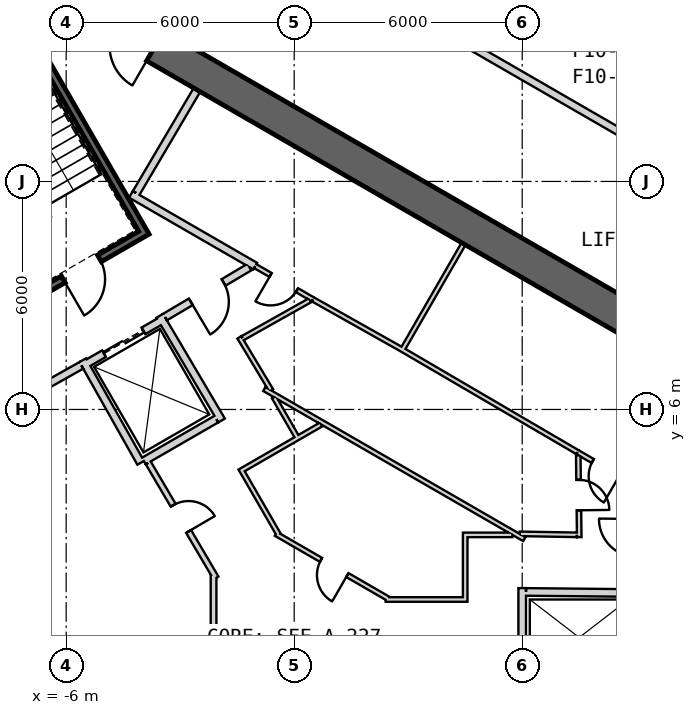
"""IFC4 building model, lengths in metres.
Left out: names, types, materials, properties, quantities, classifications, styles, units other than length and angle.
Written with IfcOpenShell. Run it as: python <this file> out.ifc"""

import sys

from ifc_helpers import new_model, si_unit, direction, frame, frame_2d, origin, place, context, subcontext, project, spatial, rectangle, extrude, element, fill, save


model = new_model("IFC4")
c1 = context("Model", 3, precision=1e-05, world=origin(), true_north=direction((0.0, 1.0)))
c2 = subcontext(c1, "Body", "Model", "MODEL_VIEW")
j1 = project(units=[si_unit("LENGTHUNIT", "METRE"), si_unit("PLANEANGLEUNIT", "RADIAN")], contexts=[c1])
p1 = place(None, origin())
s1 = spatial("IfcSite", under=j1, at=p1, CompositionType="ELEMENT")
p2 = place(p1, origin())
s2 = spatial("IfcBuilding", under=s1, at=p2, CompositionType="ELEMENT")
p3 = place(p2, frame((0.0, 0.0, 241.2)))
s3 = spatial("IfcBuildingStorey", under=s2, at=p3, CompositionType="ELEMENT", Elevation=241.2)
p4 = place(p3, frame((19.475, 2.208, 0.0), z_axis=(0.0, 0.0, 1.0), x_axis=(-0.866028369851, 0.499994862586, 0.0)))
e1 = element("IfcWall", 1, at=p4, inside=s3, PredefinedType="SHEAR", context=c2, shape_type="SweptSolid", body=[
    extrude(rectangle(XDim=31.523, YDim=0.9, at=frame_2d((15.762, 0.0))), origin(), (0.0, 0.0, 1.0), 4.0),
])
p5 = place(p4, frame((7.062, 0.0, 0.0)))
e2 = element("IfcOpeningElement", 2, at=p5, cuts=e1, PredefinedType="OPENING", context=c2, shape_type="SweptSolid", body=[
    extrude(rectangle(XDim=1.2, YDim=2.4, at=frame_2d((0.6, 1.2))), frame((0.0, 0.46, 0.0), z_axis=(0.0, -1.0, 0.0), x_axis=(1.0, 0.0, 0.0)), (0.0, 0.0, 1.0), 0.92),
])
p6 = place(p4, frame((3.612, 0.0, 0.0)))
e3 = element("IfcOpeningElement", 3, at=p6, cuts=e1, PredefinedType="OPENING", context=c2, shape_type="SweptSolid", body=[
    extrude(rectangle(XDim=1.2, YDim=2.4, at=frame_2d((0.6, 1.2))), frame((0.0, 0.46, 0.0), z_axis=(0.0, -1.0, 0.0), x_axis=(1.0, 0.0, 0.0)), (0.0, 0.0, 1.0), 0.92),
])
p7 = place(p4, frame((26.712, 0.0, 0.0)))
e4 = element("IfcOpeningElement", 4, at=p7, cuts=e1, PredefinedType="OPENING", context=c2, shape_type="SweptSolid", body=[
    extrude(rectangle(XDim=1.2, YDim=2.4, at=frame_2d((0.6, 1.2))), frame((0.0, 0.46, 0.0), z_axis=(0.0, -1.0, 0.0), x_axis=(1.0, 0.0, 0.0)), (0.0, 0.0, 1.0), 0.92),
])
p8 = place(p3, frame((6.0, -1.03, 0.0), z_axis=(0.0, 0.0, 1.0), x_axis=(0.0, 1.0, 0.0)))
e5 = element("IfcWall", 5, at=p8, inside=s3, PredefinedType="PLUMBINGWALL", context=c2, shape_type="SweptSolid", body=[
    extrude(rectangle(XDim=2.33, YDim=0.2, at=frame_2d((1.165, 0.0))), origin(), (0.0, 0.0, 1.0), 3.7),
])
p9 = place(p3, frame((9.1, 1.169, 0.0), z_axis=(0.0, 0.0, 1.0), x_axis=(-0.99994990606, 0.010009264196, 0.0)))
e6 = element("IfcWall", 6, at=p9, inside=s3, PredefinedType="PLUMBINGWALL", context=c2, shape_type="SweptSolid", body=[
    extrude(rectangle(XDim=3.0, YDim=0.2, at=frame_2d((1.5, 0.0))), origin(), (0.0, 0.0, 1.0), 3.7),
])
p10 = place(p3, frame((-7.854, 17.405, -0.3), z_axis=(0.0, 0.0, 1.0), x_axis=(0.499997992926, -0.866026562566, 0.0)))
e7 = element("IfcWall", 7, at=p10, inside=s3, PredefinedType="SHEAR", context=c2, shape_type="SweptSolid", body=[
    extrude(rectangle(XDim=7.9, YDim=0.2, at=frame_2d((3.95, 0.0))), origin(), (0.0, 0.0, 1.0), 4.0),
])
p11 = place(p3, frame((-7.159, 8.8, -0.3), z_axis=(0.0, 0.0, 1.0), x_axis=(0.866047807691, 0.499961193289, 0.0)))
e8 = element("IfcWall", 8, at=p11, inside=s3, PredefinedType="SHEAR", context=c2, shape_type="SweptSolid", body=[
    extrude(rectangle(XDim=3.6, YDim=0.2, at=frame_2d((1.8, 0.0))), origin(), (0.0, 0.0, 1.0), 4.0),
])
p12 = place(p11, frame((1.25, 0.0, 0.3)))
e9 = element("IfcOpeningElement", 9, at=p12, cuts=e8, PredefinedType="OPENING", context=c2, shape_type="SweptSolid", body=[
    extrude(rectangle(XDim=1.1, YDim=2.1, at=frame_2d((0.55, 1.05))), frame((0.0, 0.11, 0.0), z_axis=(0.0, -1.0, 0.0), x_axis=(1.0, 0.0, 0.0)), (0.0, 0.0, 1.0), 0.22),
])
p13 = place(p3, frame((-5.524, 7.168, 0.0), z_axis=(0.0, 0.0, 1.0), x_axis=(0.866024647952, 0.500001309137, 0.0)))
e10 = element("IfcWall", 10, at=p13, inside=s3, PredefinedType="PLUMBINGWALL", context=c2, shape_type="SweptSolid", body=[
    extrude(rectangle(XDim=2.4, YDim=0.2, at=frame_2d((1.2, 0.0))), origin(), (0.0, 0.0, 1.0), 3.7),
])
p14 = place(p13, frame((0.6, 0.0, 0.0)))
e11 = element("IfcOpeningElement", 11, at=p14, cuts=e10, PredefinedType="OPENING", context=c2, shape_type="SweptSolid", body=[
    extrude(rectangle(XDim=1.2, YDim=2.4, at=frame_2d((0.6, 1.2))), frame((0.0, 0.11, 0.0), z_axis=(0.0, -1.0, 0.0), x_axis=(1.0, 0.0, 0.0)), (0.0, 0.0, 1.0), 0.22),
])
p15 = place(p3, frame((-4.039, 4.596, 0.0), z_axis=(0.0, 0.0, 1.0), x_axis=(-0.491322718731, 0.870977603649, 0.0)))
e12 = element("IfcWall", 12, at=p15, inside=s3, PredefinedType="PLUMBINGWALL", context=c2, shape_type="SweptSolid", body=[
    extrude(rectangle(XDim=3.1, YDim=0.2, at=frame_2d((1.55, 0.0))), origin(), (0.0, 0.0, 1.0), 3.7),
])
p16 = place(p3, frame((-3.538, 8.465, 0.0), z_axis=(0.0, 0.0, 1.0), x_axis=(0.508616218331, -0.860993346345, 0.0)))
e13 = element("IfcWall", 13, at=p16, inside=s3, PredefinedType="PLUMBINGWALL", context=c2, shape_type="SweptSolid", body=[
    extrude(rectangle(XDim=3.2, YDim=0.2, at=frame_2d((1.6, 0.0))), origin(), (0.0, 0.0, 1.0), 3.7),
])
p17 = place(p3, frame((-2.047, 5.746, 0.0), z_axis=(0.0, 0.0, 1.0), x_axis=(-0.866019606374, -0.500010041276, 0.0)))
e14 = element("IfcWall", 14, at=p17, inside=s3, PredefinedType="PLUMBINGWALL", context=c2, shape_type="SweptSolid", body=[
    extrude(rectangle(XDim=2.205, YDim=0.2, at=frame_2d((1.102, 0.0))), origin(), (0.0, 0.0, 1.0), 3.7),
])
p18 = place(p3, frame((4.457, 10.359, 0.0), z_axis=(0.0, 0.0, 1.0), x_axis=(-0.500017246033, -0.866015446554, 0.0)))
e15 = element("IfcWall", 15, at=p18, inside=s3, PredefinedType="PARTITIONING", context=c2, shape_type="SweptSolid", body=[
    extrude(rectangle(XDim=3.25, YDim=0.12, at=frame_2d((1.625, 0.0))), origin(), (0.0, 0.0, 1.0), 3.7),
])
p19 = place(p3, frame((2.821, 7.586, 0.0), z_axis=(0.0, 0.0, 1.0), x_axis=(0.863262357411, -0.504755487615, 0.0)))
e16 = element("IfcWall", 16, at=p19, inside=s3, PredefinedType="PARTITIONING", context=c2, shape_type="SweptSolid", body=[
    extrude(rectangle(XDim=5.37, YDim=0.12, at=frame_2d((2.685, 0.0))), origin(), (0.0, 0.0, 1.0), 3.7),
])
p20 = place(p3, frame((-1.024, 9.771, 0.0), z_axis=(0.0, 0.0, 1.0), x_axis=(0.866039397417, -0.499975761534, 0.0)))
e17 = element("IfcWall", 17, at=p20, inside=s3, PredefinedType="PARTITIONING", context=c2, shape_type="SweptSolid", body=[
    extrude(rectangle(XDim=1.752, YDim=0.12, at=frame_2d((0.876, 0.0))), origin(), (0.0, 0.0, 1.0), 3.7),
])
p21 = place(p20, frame((0.466, 0.0, 0.0)))
e18 = element("IfcOpeningElement", 18, at=p21, cuts=e17, PredefinedType="OPENING", context=c2, shape_type="SweptSolid", body=[
    extrude(rectangle(XDim=0.8, YDim=2.1, at=frame_2d((0.4, 1.05))), frame((0.0, 0.07, 0.0), z_axis=(0.0, -1.0, 0.0), x_axis=(1.0, 0.0, 0.0)), (0.0, 0.0, 1.0), 0.14),
])
p22 = place(p3, frame((7.457, 4.875, 0.0), z_axis=(0.0, 0.0, 1.0), x_axis=(0.866027945518, -0.499995597562, 0.0)))
e19 = element("IfcWall", 19, at=p22, inside=s3, PredefinedType="PARTITIONING", context=c2, shape_type="SweptSolid", body=[
    extrude(rectangle(XDim=1.702, YDim=0.12, at=frame_2d((0.851, 0.0))), origin(), (0.0, 0.0, 1.0), 3.7),
])
p23 = place(p22, frame((0.461, 0.0, 0.0)))
e20 = element("IfcOpeningElement", 20, at=p23, cuts=e19, PredefinedType="OPENING", context=c2, shape_type="SweptSolid", body=[
    extrude(rectangle(XDim=0.8, YDim=2.1, at=frame_2d((0.4, 1.05))), frame((0.0, 0.07, 0.0), z_axis=(0.0, -1.0, 0.0), x_axis=(1.0, 0.0, 0.0)), (0.0, 0.0, 1.0), 0.14),
])
p24 = place(p3, frame((-4.296, 11.66, 0.0), z_axis=(0.0, 0.0, 1.0), x_axis=(0.866027389382, -0.499996560828, 0.0)))
e21 = element("IfcWall", 21, at=p24, inside=s3, PredefinedType="PARTITIONING", context=c2, shape_type="SweptSolid", body=[
    extrude(rectangle(XDim=3.778, YDim=0.2, at=frame_2d((1.889, 0.0))), origin(), (0.0, 0.0, 1.0), 3.7),
])
p25 = place(p3, frame((-2.558, 14.409, 0.0), z_axis=(0.0, 0.0, 1.0), x_axis=(-0.508018930956, -0.861345903683, 0.0)))
e22 = element("IfcWall", 22, at=p25, inside=s3, PredefinedType="PARTITIONING", context=c2, shape_type="SweptSolid", body=[
    extrude(rectangle(XDim=3.15, YDim=0.2, at=frame_2d((1.575, 0.0))), origin(), (0.0, 0.0, 1.0), 3.7),
])
p26 = place(p3, frame((0.494, 8.896, 0.0), z_axis=(0.0, 0.0, 1.0), x_axis=(0.871426548871, -0.490526013503, 0.0)))
e23 = element("IfcWall", 23, at=p26, inside=s3, PredefinedType="PARTITIONING", context=c2, shape_type="SweptSolid", body=[
    extrude(rectangle(XDim=2.67, YDim=0.12, at=frame_2d((1.335, 0.0))), origin(), (0.0, 0.0, 1.0), 3.7),
])
p27 = place(p3, frame((-5.6, 7.16, 0.0), z_axis=(0.0, 0.0, 1.0), x_axis=(-0.871340486379, -0.490678873396, 0.0)))
e24 = element("IfcWall", 24, at=p27, inside=s3, PredefinedType="PARTITIONING", context=c2, shape_type="SweptSolid", body=[
    extrude(rectangle(XDim=2.581, YDim=0.2, at=frame_2d((1.291, 0.0))), origin(), (0.0, 0.0, 1.0), 3.7),
])
p28 = place(p3, frame((-1.179, 9.745, 0.0), z_axis=(0.0, 0.0, 1.0), x_axis=(-0.860630814782, -0.509229418482, 0.0)))
e25 = element("IfcWall", 25, at=p28, inside=s3, PredefinedType="PARTITIONING", context=c2, shape_type="SweptSolid", body=[
    extrude(rectangle(XDim=2.582, YDim=0.2, at=frame_2d((1.291, 0.0))), origin(), (0.0, 0.0, 1.0), 3.7),
])
p29 = place(p28, frame((0.791, 0.0, 0.0)))
e26 = element("IfcOpeningElement", 26, at=p29, cuts=e25, PredefinedType="OPENING", context=c2, shape_type="SweptSolid", body=[
    extrude(rectangle(XDim=1.0, YDim=2.1, at=frame_2d((0.5, 1.05))), frame((0.0, 0.11, 0.0), z_axis=(0.0, -1.0, 0.0), x_axis=(1.0, 0.0, 0.0)), (0.0, 0.0, 1.0), 0.22),
])
p30 = place(p3, frame((-2.057, 1.565, 0.0), z_axis=(0.0, 0.0, 1.0), x_axis=(-0.507299271879, 0.861769951176, 0.0)))
e27 = element("IfcWall", 27, at=p30, inside=s3, PredefinedType="PLUMBINGWALL", context=c2, shape_type="SweptSolid", body=[
    extrude(rectangle(XDim=3.516, YDim=0.15, at=frame_2d((1.758, 0.0))), origin(), (0.0, 0.0, 1.0), 3.7),
])
p31 = place(p30, frame((1.422, 0.0, 0.0)))
e28 = element("IfcOpeningElement", 28, at=p31, cuts=e27, PredefinedType="OPENING", context=c2, shape_type="SweptSolid", body=[
    extrude(rectangle(XDim=0.8, YDim=2.1, at=frame_2d((0.4, 1.05))), frame((0.0, 0.085, 0.0), z_axis=(0.0, -1.0, 0.0), x_axis=(1.0, 0.0, 0.0)), (0.0, 0.0, 1.0), 0.17),
])
p32 = place(p3, frame((-2.122, -1.802, 0.0), z_axis=(0.0, 0.0, 1.0), x_axis=(0.0, 1.0, 0.0)))
e29 = element("IfcWall", 29, at=p32, inside=s3, PredefinedType="PLUMBINGWALL", context=c2, shape_type="SweptSolid", body=[
    extrude(rectangle(XDim=3.454, YDim=0.15, at=frame_2d((1.727, 0.0))), origin(), (0.0, 0.0, 1.0), 3.7),
])
p33 = place(p3, frame((-0.786, 6.538, 0.0), z_axis=(0.0, 0.0, 1.0), x_axis=(0.866034288228, -0.499984611377, 0.0)))
e30 = element("IfcWall", 30, at=p33, inside=s3, PredefinedType="PARTITIONING", context=c2, shape_type="SweptSolid", body=[
    extrude(rectangle(XDim=7.9, YDim=0.12, at=frame_2d((3.95, 0.0))), origin(), (0.0, 0.0, 1.0), 3.7),
])
p34 = place(p3, frame((4.44, 2.7, 0.0), z_axis=(0.0, 0.0, 1.0), x_axis=(1.0, 0.0, 0.0)))
e31 = element("IfcWall", 31, at=p34, inside=s3, PredefinedType="PARTITIONING", context=c2, shape_type="SweptSolid", body=[
    extrude(rectangle(XDim=1.302, YDim=0.12, at=frame_2d((0.651, 0.0))), origin(), (0.0, 0.0, 1.0), 3.7),
])
p35 = place(p3, frame((4.5, 0.94, 0.0), z_axis=(0.0, 0.0, 1.0), x_axis=(0.0, 1.0, 0.0)))
e32 = element("IfcWall", 32, at=p35, inside=s3, PredefinedType="PARTITIONING", context=c2, shape_type="SweptSolid", body=[
    extrude(rectangle(XDim=1.7, YDim=0.12, at=frame_2d((0.85, 0.0))), origin(), (0.0, 0.0, 1.0), 3.7),
])
p36 = place(p3, frame((2.407, 1.0, 0.0), z_axis=(0.0, 0.0, 1.0), x_axis=(1.0, 0.0, 0.0)))
e33 = element("IfcWall", 33, at=p36, inside=s3, PredefinedType="PARTITIONING", context=c2, shape_type="SweptSolid", body=[
    extrude(rectangle(XDim=2.032, YDim=0.12, at=frame_2d((1.016, 0.0))), origin(), (0.0, 0.0, 1.0), 3.7),
])
p37 = place(p3, frame((-0.48, 2.727, 0.0), z_axis=(0.0, 0.0, 1.0), x_axis=(0.86601279846, -0.500021832428, 0.0)))
e34 = element("IfcWall", 34, at=p37, inside=s3, PredefinedType="PARTITIONING", context=c2, shape_type="SweptSolid", body=[
    extrude(rectangle(XDim=3.435, YDim=0.12, at=frame_2d((1.718, 0.0))), origin(), (0.0, 0.0, 1.0), 3.7),
])
p38 = place(p37, frame((1.37, 0.0, 0.0)))
e35 = element("IfcOpeningElement", 35, at=p38, cuts=e34, PredefinedType="OPENING", context=c2, shape_type="SweptSolid", body=[
    extrude(rectangle(XDim=0.8, YDim=2.1, at=frame_2d((0.4, 1.05))), frame((0.0, 0.07, 0.0), z_axis=(0.0, -1.0, 0.0), x_axis=(1.0, 0.0, 0.0)), (0.0, 0.0, 1.0), 0.14),
])
p39 = place(p3, frame((-1.414, 4.449, 0.0), z_axis=(0.0, 0.0, 1.0), x_axis=(0.500097243556, -0.865969252911, 0.0)))
e36 = element("IfcWall", 36, at=p39, inside=s3, PredefinedType="PARTITIONING", context=c2, shape_type="SweptSolid", body=[
    extrude(rectangle(XDim=2.03, YDim=0.12, at=frame_2d((1.015, 0.0))), origin(), (0.0, 0.0, 1.0), 3.7),
])
p40 = place(p3, frame((0.709, 5.605, 0.0), z_axis=(0.0, 0.0, 1.0), x_axis=(-0.8660096254, -0.500027327967, 0.0)))
e37 = element("IfcWall", 37, at=p40, inside=s3, PredefinedType="PARTITIONING", context=c2, shape_type="SweptSolid", body=[
    extrude(rectangle(XDim=2.357, YDim=0.12, at=frame_2d((1.178, 0.0))), origin(), (0.0, 0.0, 1.0), 3.7),
])
p41 = place(p3, frame((-0.532, 6.322, 0.0), z_axis=(0.0, 0.0, 1.0), x_axis=(0.50005036918, -0.865996321171, 0.0)))
e38 = element("IfcWall", 38, at=p41, inside=s3, PredefinedType="PARTITIONING", context=c2, shape_type="SweptSolid", body=[
    extrude(rectangle(XDim=1.182, YDim=0.12, at=frame_2d((0.591, 0.0))), origin(), (0.0, 0.0, 1.0), 3.7),
])
p42 = place(p3, frame((-1.443, 7.897, 0.0), z_axis=(0.0, 0.0, 1.0), x_axis=(0.514937238613, -0.85722788119, 0.0)))
e39 = element("IfcWall", 39, at=p42, inside=s3, PredefinedType="PARTITIONING", context=c2, shape_type="SweptSolid", body=[
    extrude(rectangle(XDim=1.626, YDim=0.12, at=frame_2d((0.813, 0.0))), origin(), (0.0, 0.0, 1.0), 3.7),
])
p43 = place(p3, frame((0.414, 8.871, 0.0), z_axis=(0.0, 0.0, 1.0), x_axis=(-0.871809386997, -0.48984527429, 0.0)))
e40 = element("IfcWall", 40, at=p43, inside=s3, PredefinedType="PARTITIONING", context=c2, shape_type="SweptSolid", body=[
    extrude(rectangle(XDim=2.034, YDim=0.12, at=frame_2d((1.017, 0.0))), origin(), (0.0, 0.0, 1.0), 3.7),
])
p44 = place(p3, frame((7.501, 2.64, 0.0), z_axis=(0.0, 0.0, 1.0), x_axis=(-0.01178388431, 0.999930567625, 0.0)))
e41 = element("IfcWall", 41, at=p44, inside=s3, PredefinedType="PARTITIONING", context=c2, shape_type="SweptSolid", body=[
    extrude(rectangle(XDim=2.155, YDim=0.12, at=frame_2d((1.077, 0.0))), origin(), (0.0, 0.0, 1.0), 3.7),
])
p45 = place(p44, frame((0.707, 0.0, 0.0)))
e42 = element("IfcOpeningElement", 42, at=p45, cuts=e41, PredefinedType="OPENING", context=c2, shape_type="SweptSolid", body=[
    extrude(rectangle(XDim=0.8, YDim=2.1, at=frame_2d((0.4, 1.05))), frame((0.0, 0.07, 0.0), z_axis=(0.0, -1.0, 0.0), x_axis=(1.0, 0.0, 0.0)), (0.0, 0.0, 1.0), 0.14),
])
p46 = place(p3, frame((5.934, 2.727, 0.0), z_axis=(0.0, 0.0, 1.0), x_axis=(0.999846739959, -0.017507044085, 0.0)))
e43 = element("IfcWall", 43, at=p46, inside=s3, PredefinedType="PARTITIONING", context=c2, shape_type="SweptSolid", body=[
    extrude(rectangle(XDim=1.506, YDim=0.12, at=frame_2d((0.753, 0.0))), origin(), (0.0, 0.0, 1.0), 3.7),
])
p47 = place(p3, frame((9.675, 12.658, 0.0), z_axis=(0.0, 0.0, 1.0), x_axis=(-0.866025327327, 0.500000132428, 0.0)))
e44 = element("IfcWall", 44, at=p47, inside=s3, PredefinedType="PARTITIONING", context=c2, shape_type="SweptSolid", body=[
    extrude(rectangle(XDim=18.443, YDim=0.2, at=frame_2d((9.222, 0.0))), origin(), (0.0, 0.0, 1.0), 2.98),
])
p48 = place(p47, frame((15.138, 0.0, 0.0)))
e45 = element("IfcOpeningElement", 45, at=p48, cuts=e44, PredefinedType="OPENING", context=c2, shape_type="SweptSolid", body=[
    extrude(rectangle(XDim=1.0, YDim=2.1, at=frame_2d((0.5, 1.05))), frame((0.0, 0.11, 0.0), z_axis=(0.0, -1.0, 0.0), x_axis=(1.0, 0.0, 0.0)), (0.0, 0.0, 1.0), 0.22),
])
p49 = place(p12, origin())
e46 = element("IfcDoor", 46, at=p49, inside=s3, OperationType="SINGLE_SWING_RIGHT", PredefinedType="USERDEFINED", context=c2, shape_type="SweptSolid", body=[
    extrude(rectangle(XDim=1.1, YDim=2.1, at=frame_2d((0.55, 1.05))), frame((0.0, 0.025, 0.0), z_axis=(0.0, -1.0, 0.0), x_axis=(1.0, 0.0, 0.0)), (0.0, 0.0, 1.0), 0.05),
])
fill(e9, e46)
p50 = place(p29, origin())
e47 = element("IfcDoor", 47, at=p50, inside=s3, OperationType="SINGLE_SWING_RIGHT", PredefinedType="USERDEFINED", context=c2, shape_type="SweptSolid", body=[
    extrude(rectangle(XDim=1.0, YDim=2.1, at=frame_2d((0.5, 1.05))), frame((0.0, 0.025, 0.0), z_axis=(0.0, -1.0, 0.0), x_axis=(1.0, 0.0, 0.0)), (0.0, 0.0, 1.0), 0.05),
])
fill(e26, e47)
p51 = place(p14, origin())
e48 = element("IfcDoor", 48, at=p51, inside=s3, OperationType="SLIDING_TO_LEFT", PredefinedType="USERDEFINED", context=c2, shape_type="SweptSolid", body=[
    extrude(rectangle(XDim=1.2, YDim=2.4, at=frame_2d((0.6, 1.2))), frame((0.0, 0.025, 0.0), z_axis=(0.0, -1.0, 0.0), x_axis=(1.0, 0.0, 0.0)), (0.0, 0.0, 1.0), 0.05),
])
fill(e11, e48)
p52 = place(p31, origin())
e49 = element("IfcDoor", 49, at=p52, inside=s3, OperationType="SINGLE_SWING_LEFT", PredefinedType="USERDEFINED", context=c2, shape_type="SweptSolid", body=[
    extrude(rectangle(XDim=0.8, YDim=2.1, at=frame_2d((0.4, 1.05))), frame((0.0, 0.025, 0.0), z_axis=(0.0, -1.0, 0.0), x_axis=(1.0, 0.0, 0.0)), (0.0, 0.0, 1.0), 0.05),
])
fill(e28, e49)
p53 = place(p38, origin())
e50 = element("IfcDoor", 50, at=p53, inside=s3, OperationType="SINGLE_SWING_LEFT", PredefinedType="USERDEFINED", context=c2, shape_type="SweptSolid", body=[
    extrude(rectangle(XDim=0.8, YDim=2.1, at=frame_2d((0.4, 1.05))), frame((0.0, 0.025, 0.0), z_axis=(0.0, -1.0, 0.0), x_axis=(1.0, 0.0, 0.0)), (0.0, 0.0, 1.0), 0.05),
])
fill(e35, e50)
p54 = place(p45, origin())
e51 = element("IfcDoor", 51, at=p54, inside=s3, OperationType="SINGLE_SWING_RIGHT", PredefinedType="USERDEFINED", context=c2, shape_type="SweptSolid", body=[
    extrude(rectangle(XDim=0.8, YDim=2.1, at=frame_2d((0.4, 1.05))), frame((0.0, 0.025, 0.0), z_axis=(0.0, -1.0, 0.0), x_axis=(1.0, 0.0, 0.0)), (0.0, 0.0, 1.0), 0.05),
])
fill(e42, e51)
p55 = place(p23, origin())
e52 = element("IfcDoor", 52, at=p55, inside=s3, OperationType="SINGLE_SWING_LEFT", PredefinedType="USERDEFINED", context=c2, shape_type="SweptSolid", body=[
    extrude(rectangle(XDim=0.8, YDim=2.1, at=frame_2d((0.4, 1.05))), frame((0.0, 0.025, 0.0), z_axis=(0.0, -1.0, 0.0), x_axis=(1.0, 0.0, 0.0)), (0.0, 0.0, 1.0), 0.05),
])
fill(e20, e52)
p56 = place(p21, origin())
e53 = element("IfcDoor", 53, at=p56, inside=s3, OperationType="SINGLE_SWING_RIGHT", PredefinedType="USERDEFINED", context=c2, shape_type="SweptSolid", body=[
    extrude(rectangle(XDim=0.8, YDim=2.1, at=frame_2d((0.4, 1.05))), frame((0.0, 0.025, 0.0), z_axis=(0.0, -1.0, 0.0), x_axis=(1.0, 0.0, 0.0)), (0.0, 0.0, 1.0), 0.05),
])
fill(e18, e53)
save(model, sys.argv[1])
